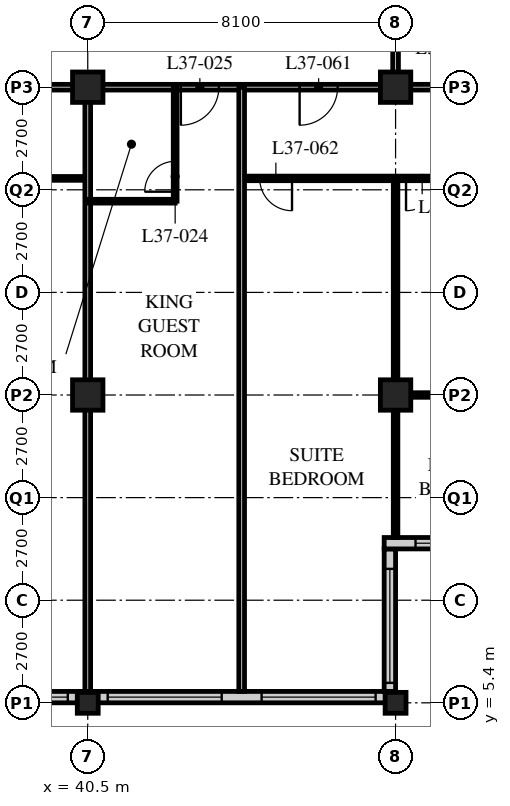
"""IFC4 building model, lengths in metres.
Left out: names, types, materials, properties, quantities, classifications, styles, units other than length and angle.
Written with IfcOpenShell. Run it as: python <this file> out.ifc"""

import sys

from ifc_helpers import new_model, si_unit, direction, frame, frame_2d, origin, origin_2d, place, context, subcontext, project, spatial, rectangle, hollow_rectangle, extrude, element, fill, save


model = new_model("IFC4")
c1 = context("Model", 3, precision=1e-05, world=origin(), true_north=direction((0.0, 1.0)))
c2 = subcontext(c1, "Body", "Model", "MODEL_VIEW")
j1 = project(units=[si_unit("LENGTHUNIT", "METRE"), si_unit("PLANEANGLEUNIT", "RADIAN")], contexts=[c1])
p1 = place(None, origin())
s1 = spatial("IfcSite", under=j1, at=p1, CompositionType="ELEMENT")
p2 = place(p1, origin())
s2 = spatial("IfcBuilding", under=s1, at=p2, CompositionType="ELEMENT")
p3 = place(p2, frame((0.0, 0.0, 144.2)))
s3 = spatial("IfcBuildingStorey", under=s2, at=p3, CompositionType="ELEMENT", Elevation=144.2)
p4 = place(p3, frame((40.5, 5.4, 0.0), z_axis=(0.0, 0.0, 1.0), x_axis=(1.0, 0.0, 0.0)))
e1 = element("IfcColumn", 1, at=p4, inside=s3, PredefinedType="COLUMN", context=c2, shape_type="SweptSolid", body=[
    extrude(hollow_rectangle(XDim=0.55, YDim=0.55, WallThickness=0.04, at=origin_2d()), origin(), (0.0, 0.0, 1.0), 3.4),
])
for number, where, z_axis, x_axis in (
    (2, (40.5, 13.5, 0.0), (0.0, 0.0, 1.0), (1.0, 0.0, 0.0)),
    (3, (40.5, 21.6, 0.0), (0.0, 0.0, 1.0), (1.0, 0.0, 0.0)),
):
    element("IfcColumn", number, at=place(p3, frame(where, z_axis=z_axis, x_axis=x_axis)), inside=s3, PredefinedType="COLUMN", context=c2, shape_type="SweptSolid", body=[
        extrude(hollow_rectangle(XDim=0.8, YDim=0.8, WallThickness=0.08, at=origin_2d()), origin(), (0.0, 0.0, 1.0), 3.4),
    ])
p5 = place(p3, frame((48.6, 5.4, 0.0), z_axis=(0.0, 0.0, 1.0), x_axis=(1.0, 0.0, 0.0)))
e4 = element("IfcColumn", 4, at=p5, inside=s3, PredefinedType="COLUMN", context=c2, shape_type="SweptSolid", body=[
    extrude(hollow_rectangle(XDim=0.55, YDim=0.55, WallThickness=0.04, at=origin_2d()), origin(), (0.0, 0.0, 1.0), 3.4),
])
for number, where, z_axis, x_axis in (
    (5, (48.6, 13.5, 0.0), (0.0, 0.0, 1.0), (1.0, 0.0, 0.0)),
    (6, (48.6, 21.6, 0.0), (0.0, 0.0, 1.0), (1.0, 0.0, 0.0)),
):
    element("IfcColumn", number, at=place(p3, frame(where, z_axis=z_axis, x_axis=x_axis)), inside=s3, PredefinedType="COLUMN", context=c2, shape_type="SweptSolid", body=[
        extrude(hollow_rectangle(XDim=0.8, YDim=0.8, WallThickness=0.08, at=origin_2d()), origin(), (0.0, 0.0, 1.0), 3.4),
    ])
p6 = place(p3, frame((8.4, 5.55, 0.0), z_axis=(0.0, 0.0, 1.0), x_axis=(1.0, 0.0, 0.0)))
e7 = element("IfcWall", 7, at=p6, inside=s3, PredefinedType="SOLIDWALL", context=c2, shape_type="SweptSolid", body=[
    extrude(rectangle(XDim=40.2, YDim=0.3, at=frame_2d((20.1, 0.0))), origin(), (0.0, 0.0, 1.0), 3.19),
])
p7 = place(p6, frame((0.225, 0.0, 0.9)))
e8 = element("IfcOpeningElement", 8, at=p7, cuts=e7, PredefinedType="OPENING", context=c2, shape_type="SweptSolid", body=[
    extrude(rectangle(XDim=3.0, YDim=1.4, at=frame_2d((1.5, 0.7))), frame((0.0, 0.16, 0.0), z_axis=(0.0, -1.0, 0.0), x_axis=(1.0, 0.0, 0.0)), (0.0, 0.0, 1.0), 0.32),
])
p8 = place(p6, frame((4.275, 0.0, 0.9)))
e9 = element("IfcOpeningElement", 9, at=p8, cuts=e7, PredefinedType="OPENING", context=c2, shape_type="SweptSolid", body=[
    extrude(rectangle(XDim=3.0, YDim=1.4, at=frame_2d((1.5, 0.7))), frame((0.0, 0.16, 0.0), z_axis=(0.0, -1.0, 0.0), x_axis=(1.0, 0.0, 0.0)), (0.0, 0.0, 1.0), 0.32),
])
p9 = place(p6, frame((8.325, 0.0, 0.9)))
e10 = element("IfcOpeningElement", 10, at=p9, cuts=e7, PredefinedType="OPENING", context=c2, shape_type="SweptSolid", body=[
    extrude(rectangle(XDim=3.0, YDim=1.4, at=frame_2d((1.5, 0.7))), frame((0.0, 0.16, 0.0), z_axis=(0.0, -1.0, 0.0), x_axis=(1.0, 0.0, 0.0)), (0.0, 0.0, 1.0), 0.32),
])
p10 = place(p6, frame((12.375, 0.0, 0.9)))
e11 = element("IfcOpeningElement", 11, at=p10, cuts=e7, PredefinedType="OPENING", context=c2, shape_type="SweptSolid", body=[
    extrude(rectangle(XDim=3.0, YDim=1.4, at=frame_2d((1.5, 0.7))), frame((0.0, 0.16, 0.0), z_axis=(0.0, -1.0, 0.0), x_axis=(1.0, 0.0, 0.0)), (0.0, 0.0, 1.0), 0.32),
])
p11 = place(p6, frame((16.425, 0.0, 0.9)))
e12 = element("IfcOpeningElement", 12, at=p11, cuts=e7, PredefinedType="OPENING", context=c2, shape_type="SweptSolid", body=[
    extrude(rectangle(XDim=3.0, YDim=1.4, at=frame_2d((1.5, 0.7))), frame((0.0, 0.16, 0.0), z_axis=(0.0, -1.0, 0.0), x_axis=(1.0, 0.0, 0.0)), (0.0, 0.0, 1.0), 0.32),
])
p12 = place(p6, frame((20.475, 0.0, 0.9)))
e13 = element("IfcOpeningElement", 13, at=p12, cuts=e7, PredefinedType="OPENING", context=c2, shape_type="SweptSolid", body=[
    extrude(rectangle(XDim=3.0, YDim=1.4, at=frame_2d((1.5, 0.7))), frame((0.0, 0.16, 0.0), z_axis=(0.0, -1.0, 0.0), x_axis=(1.0, 0.0, 0.0)), (0.0, 0.0, 1.0), 0.32),
])
p13 = place(p6, frame((24.525, 0.0, 0.9)))
e14 = element("IfcOpeningElement", 14, at=p13, cuts=e7, PredefinedType="OPENING", context=c2, shape_type="SweptSolid", body=[
    extrude(rectangle(XDim=3.0, YDim=1.4, at=frame_2d((1.5, 0.7))), frame((0.0, 0.16, 0.0), z_axis=(0.0, -1.0, 0.0), x_axis=(1.0, 0.0, 0.0)), (0.0, 0.0, 1.0), 0.32),
])
p14 = place(p6, frame((28.575, 0.0, 0.9)))
e15 = element("IfcOpeningElement", 15, at=p14, cuts=e7, PredefinedType="OPENING", context=c2, shape_type="SweptSolid", body=[
    extrude(rectangle(XDim=3.0, YDim=1.4, at=frame_2d((1.5, 0.7))), frame((0.0, 0.16, 0.0), z_axis=(0.0, -1.0, 0.0), x_axis=(1.0, 0.0, 0.0)), (0.0, 0.0, 1.0), 0.32),
])
p15 = place(p6, frame((32.625, 0.0, 0.9)))
e16 = element("IfcOpeningElement", 16, at=p15, cuts=e7, PredefinedType="OPENING", context=c2, shape_type="SweptSolid", body=[
    extrude(rectangle(XDim=3.0, YDim=1.4, at=frame_2d((1.5, 0.7))), frame((0.0, 0.16, 0.0), z_axis=(0.0, -1.0, 0.0), x_axis=(1.0, 0.0, 0.0)), (0.0, 0.0, 1.0), 0.32),
])
p16 = place(p6, frame((36.675, 0.0, 0.9)))
e17 = element("IfcOpeningElement", 17, at=p16, cuts=e7, PredefinedType="OPENING", context=c2, shape_type="SweptSolid", body=[
    extrude(rectangle(XDim=3.0, YDim=1.4, at=frame_2d((1.5, 0.7))), frame((0.0, 0.16, 0.0), z_axis=(0.0, -1.0, 0.0), x_axis=(1.0, 0.0, 0.0)), (0.0, 0.0, 1.0), 0.32),
])
p17 = place(p3, frame((48.45, 5.7, 0.0), z_axis=(0.0, 0.0, 1.0), x_axis=(0.0, 1.0, 0.0)))
e18 = element("IfcWall", 18, at=p17, inside=s3, PredefinedType="SOLIDWALL", context=c2, shape_type="SweptSolid", body=[
    extrude(rectangle(XDim=3.75, YDim=0.3, at=frame_2d((1.875, 0.0))), origin(), (0.0, 0.0, 1.0), 3.19),
])
p18 = place(p17, frame((0.225, 0.0, 0.9)))
e19 = element("IfcOpeningElement", 19, at=p18, cuts=e18, PredefinedType="OPENING", context=c2, shape_type="SweptSolid", body=[
    extrude(rectangle(XDim=3.0, YDim=1.4, at=frame_2d((1.5, 0.7))), frame((0.0, 0.16, 0.0), z_axis=(0.0, -1.0, 0.0), x_axis=(1.0, 0.0, 0.0)), (0.0, 0.0, 1.0), 0.32),
])
p19 = place(p3, frame((48.3, 9.6, 0.0), z_axis=(0.0, 0.0, 1.0), x_axis=(1.0, 0.0, 0.0)))
e20 = element("IfcWall", 20, at=p19, inside=s3, PredefinedType="SOLIDWALL", context=c2, shape_type="SweptSolid", body=[
    extrude(rectangle(XDim=4.35, YDim=0.3, at=frame_2d((2.175, 0.0))), origin(), (0.0, 0.0, 1.0), 3.19),
])
p20 = place(p19, frame((0.825, 0.0, 0.9)))
e21 = element("IfcOpeningElement", 21, at=p20, cuts=e20, PredefinedType="OPENING", context=c2, shape_type="SweptSolid", body=[
    extrude(rectangle(XDim=3.0, YDim=1.4, at=frame_2d((1.5, 0.7))), frame((0.0, 0.16, 0.0), z_axis=(0.0, -1.0, 0.0), x_axis=(1.0, 0.0, 0.0)), (0.0, 0.0, 1.0), 0.32),
])
p21 = place(p3, frame((12.15, 21.6, 0.0), z_axis=(0.0, 0.0, 1.0), x_axis=(1.0, 0.0, 0.0)))
e22 = element("IfcWall", 22, at=p21, inside=s3, PredefinedType="PARTITIONING", context=c2, shape_type="SweptSolid", body=[
    extrude(rectangle(XDim=36.45, YDim=0.15, at=frame_2d((18.225, 0.0))), origin(), (0.0, 0.0, 1.0), 2.42),
])
p22 = place(p21, frame((5.95, 0.0, 0.0)))
e23 = element("IfcOpeningElement", 23, at=p22, cuts=e22, PredefinedType="OPENING", context=c2, shape_type="SweptSolid", body=[
    extrude(rectangle(XDim=1.0, YDim=2.1, at=frame_2d((0.5, 1.05))), frame((0.0, 0.085, 0.0), z_axis=(0.0, -1.0, 0.0), x_axis=(1.0, 0.0, 0.0)), (0.0, 0.0, 1.0), 0.17),
])
p23 = place(p21, frame((14.05, 0.0, 0.0)))
e24 = element("IfcOpeningElement", 24, at=p23, cuts=e22, PredefinedType="OPENING", context=c2, shape_type="SweptSolid", body=[
    extrude(rectangle(XDim=1.0, YDim=2.1, at=frame_2d((0.5, 1.05))), frame((0.0, 0.085, 0.0), z_axis=(0.0, -1.0, 0.0), x_axis=(1.0, 0.0, 0.0)), (0.0, 0.0, 1.0), 0.17),
])
p24 = place(p21, frame((22.15, 0.0, 0.0)))
e25 = element("IfcOpeningElement", 25, at=p24, cuts=e22, PredefinedType="OPENING", context=c2, shape_type="SweptSolid", body=[
    extrude(rectangle(XDim=1.0, YDim=2.1, at=frame_2d((0.5, 1.05))), frame((0.0, 0.085, 0.0), z_axis=(0.0, -1.0, 0.0), x_axis=(1.0, 0.0, 0.0)), (0.0, 0.0, 1.0), 0.17),
])
p25 = place(p21, frame((30.8, 0.0, 0.0)))
e26 = element("IfcOpeningElement", 26, at=p25, cuts=e22, PredefinedType="OPENING", context=c2, shape_type="SweptSolid", body=[
    extrude(rectangle(XDim=1.0, YDim=2.1, at=frame_2d((0.5, 1.05))), frame((0.0, 0.085, 0.0), z_axis=(0.0, -1.0, 0.0), x_axis=(1.0, 0.0, 0.0)), (0.0, 0.0, 1.0), 0.17),
])
p26 = place(p21, frame((1.525, 0.0, 0.0)))
e27 = element("IfcOpeningElement", 27, at=p26, cuts=e22, PredefinedType="OPENING", context=c2, shape_type="SweptSolid", body=[
    extrude(rectangle(XDim=1.0, YDim=2.1, at=frame_2d((0.5, 1.05))), frame((0.0, 0.085, 0.0), z_axis=(0.0, -1.0, 0.0), x_axis=(1.0, 0.0, 0.0)), (0.0, 0.0, 1.0), 0.17),
])
p27 = place(p21, frame((33.925, 0.0, 0.0)))
e28 = element("IfcOpeningElement", 28, at=p27, cuts=e22, PredefinedType="OPENING", context=c2, shape_type="SweptSolid", body=[
    extrude(rectangle(XDim=1.0, YDim=2.1, at=frame_2d((0.5, 1.05))), frame((0.0, 0.085, 0.0), z_axis=(0.0, -1.0, 0.0), x_axis=(1.0, 0.0, 0.0)), (0.0, 0.0, 1.0), 0.17),
])
p28 = place(p3, frame((48.6, 21.6, 0.0), z_axis=(0.0, 0.0, 1.0), x_axis=(0.0, 1.0, 0.0)))
e29 = element("IfcWall", 29, at=p28, inside=s3, PredefinedType="PARTITIONING", context=c2, shape_type="SweptSolid", body=[
    extrude(rectangle(XDim=24.3, YDim=0.15, at=frame_2d((12.15, 0.0))), origin(), (0.0, 0.0, 1.0), 2.42),
])
p29 = place(p28, frame((2.75, 0.0, 0.0)))
e30 = element("IfcOpeningElement", 30, at=p29, cuts=e29, PredefinedType="OPENING", context=c2, shape_type="SweptSolid", body=[
    extrude(rectangle(XDim=1.0, YDim=2.1, at=frame_2d((0.5, 1.05))), frame((0.0, 0.085, 0.0), z_axis=(0.0, -1.0, 0.0), x_axis=(1.0, 0.0, 0.0)), (0.0, 0.0, 1.0), 0.17),
])
p30 = place(p28, frame((4.65, 0.0, 0.0)))
e31 = element("IfcOpeningElement", 31, at=p30, cuts=e29, PredefinedType="OPENING", context=c2, shape_type="SweptSolid", body=[
    extrude(rectangle(XDim=1.0, YDim=2.1, at=frame_2d((0.5, 1.05))), frame((0.0, 0.085, 0.0), z_axis=(0.0, -1.0, 0.0), x_axis=(1.0, 0.0, 0.0)), (0.0, 0.0, 1.0), 0.17),
])
p31 = place(p28, frame((13.675, 0.0, 0.0)))
e32 = element("IfcOpeningElement", 32, at=p31, cuts=e29, PredefinedType="OPENING", context=c2, shape_type="SweptSolid", body=[
    extrude(rectangle(XDim=1.0, YDim=2.1, at=frame_2d((0.5, 1.05))), frame((0.0, 0.085, 0.0), z_axis=(0.0, -1.0, 0.0), x_axis=(1.0, 0.0, 0.0)), (0.0, 0.0, 1.0), 0.17),
])
p32 = place(p28, frame((20.85, 0.0, 0.0)))
e33 = element("IfcOpeningElement", 33, at=p32, cuts=e29, PredefinedType="OPENING", context=c2, shape_type="SweptSolid", body=[
    extrude(rectangle(XDim=1.0, YDim=2.1, at=frame_2d((0.5, 1.05))), frame((0.0, 0.085, 0.0), z_axis=(0.0, -1.0, 0.0), x_axis=(1.0, 0.0, 0.0)), (0.0, 0.0, 1.0), 0.17),
])
p33 = place(p3, frame((37.9, 19.2, 0.0), z_axis=(0.0, 0.0, 1.0), x_axis=(1.0, 0.0, 0.0)))
e34 = element("IfcWall", 34, at=p33, inside=s3, PredefinedType="PARTITIONING", context=c2, shape_type="SweptSolid", body=[
    extrude(rectangle(XDim=2.6, YDim=0.1, at=frame_2d((1.3, 0.0))), origin(), (0.0, 0.0, 1.0), 3.19),
])
p34 = place(p3, frame((40.5, 21.6, 0.0), z_axis=(0.0, 0.0, 1.0), x_axis=(0.0, -1.0, 0.0)))
e35 = element("IfcWall", 35, at=p34, inside=s3, PredefinedType="PARTITIONING", context=c2, shape_type="SweptSolid", body=[
    extrude(rectangle(XDim=15.9, YDim=0.15, at=frame_2d((7.95, 0.0))), origin(), (0.0, 0.0, 1.0), 2.42),
])
p35 = place(p3, frame((40.5, 18.6, 0.0), z_axis=(0.0, 0.0, 1.0), x_axis=(1.0, 0.0, 0.0)))
e36 = element("IfcWall", 36, at=p35, inside=s3, PredefinedType="PARTITIONING", context=c2, shape_type="SweptSolid", body=[
    extrude(rectangle(XDim=2.3, YDim=0.1, at=frame_2d((1.15, 0.0))), origin(), (0.0, 0.0, 1.0), 3.19),
])
p36 = place(p3, frame((42.8, 21.6, 0.0), z_axis=(0.0, 0.0, 1.0), x_axis=(0.0, -1.0, 0.0)))
e37 = element("IfcWall", 37, at=p36, inside=s3, PredefinedType="PARTITIONING", context=c2, shape_type="SweptSolid", body=[
    extrude(rectangle(XDim=3.0, YDim=0.1, at=frame_2d((1.5, 0.0))), origin(), (0.0, 0.0, 1.0), 3.19),
])
p37 = place(p36, frame((1.95, 0.0, 0.0)))
e38 = element("IfcOpeningElement", 38, at=p37, cuts=e37, PredefinedType="OPENING", context=c2, shape_type="SweptSolid", body=[
    extrude(rectangle(XDim=0.8, YDim=2.1, at=frame_2d((0.4, 1.05))), frame((0.0, 0.06, 0.0), z_axis=(0.0, -1.0, 0.0), x_axis=(1.0, 0.0, 0.0)), (0.0, 0.0, 1.0), 0.12),
])
p38 = place(p3, frame((44.55, 19.2, 0.0), z_axis=(0.0, 0.0, 1.0), x_axis=(1.0, 0.0, 0.0)))
e39 = element("IfcWall", 39, at=p38, inside=s3, PredefinedType="PARTITIONING", context=c2, shape_type="SweptSolid", body=[
    extrude(rectangle(XDim=8.05, YDim=0.12, at=frame_2d((4.025, 0.0))), origin(), (0.0, 0.0, 1.0), 3.19),
])
p39 = place(p38, frame((0.475, 0.0, 0.0)))
e40 = element("IfcOpeningElement", 40, at=p39, cuts=e39, PredefinedType="OPENING", context=c2, shape_type="SweptSolid", body=[
    extrude(rectangle(XDim=0.85, YDim=2.1, at=frame_2d((0.425, 1.05))), frame((0.0, 0.07, 0.0), z_axis=(0.0, -1.0, 0.0), x_axis=(1.0, 0.0, 0.0)), (0.0, 0.0, 1.0), 0.14),
])
p40 = place(p38, frame((4.325, 0.0, 0.0)))
e41 = element("IfcOpeningElement", 41, at=p40, cuts=e39, PredefinedType="OPENING", context=c2, shape_type="SweptSolid", body=[
    extrude(rectangle(XDim=0.85, YDim=2.1, at=frame_2d((0.425, 1.05))), frame((0.0, 0.07, 0.0), z_axis=(0.0, -1.0, 0.0), x_axis=(1.0, 0.0, 0.0)), (0.0, 0.0, 1.0), 0.14),
])
p41 = place(p3, frame((48.6, 19.2, 0.0), z_axis=(0.0, 0.0, 1.0), x_axis=(0.0, -1.0, 0.0)))
e42 = element("IfcWall", 42, at=p41, inside=s3, PredefinedType="PARTITIONING", context=c2, shape_type="SweptSolid", body=[
    extrude(rectangle(XDim=9.45, YDim=0.12, at=frame_2d((4.725, 0.0))), origin(), (0.0, 0.0, 1.0), 2.42),
])
p42 = place(p3, frame((48.6, 13.5, 0.0), z_axis=(0.0, 0.0, 1.0), x_axis=(1.0, 0.0, 0.0)))
e43 = element("IfcWall", 43, at=p42, inside=s3, PredefinedType="PARTITIONING", context=c2, shape_type="SweptSolid", body=[
    extrude(rectangle(XDim=3.75, YDim=0.12, at=frame_2d((1.875, 0.0))), origin(), (0.0, 0.0, 1.0), 2.42),
])
p43 = place(p42, frame((1.875, 0.0, 0.0)))
e44 = element("IfcOpeningElement", 44, at=p43, cuts=e43, PredefinedType="OPENING", context=c2, shape_type="SweptSolid", body=[
    extrude(rectangle(XDim=0.85, YDim=2.1, at=frame_2d((0.425, 1.05))), frame((0.0, 0.07, 0.0), z_axis=(0.0, -1.0, 0.0), x_axis=(1.0, 0.0, 0.0)), (0.0, 0.0, 1.0), 0.14),
])
p44 = place(p3, frame((48.6, 21.6, 0.0), z_axis=(0.0, 0.0, 1.0), x_axis=(1.0, 0.0, 0.0)))
e45 = element("IfcWall", 45, at=p44, inside=s3, PredefinedType="PARTITIONING", context=c2, shape_type="SweptSolid", body=[
    extrude(rectangle(XDim=7.8, YDim=0.15, at=frame_2d((3.9, 0.0))), origin(), (0.0, 0.0, 1.0), 2.42),
])
p45 = place(p3, frame((44.55, 21.6, 0.0), z_axis=(0.0, 0.0, 1.0), x_axis=(0.0, -1.0, 0.0)))
e46 = element("IfcWall", 46, at=p45, inside=s3, PredefinedType="PARTITIONING", context=c2, shape_type="SweptSolid", body=[
    extrude(rectangle(XDim=15.9, YDim=0.15, at=frame_2d((7.95, 0.0))), origin(), (0.0, 0.0, 1.0), 3.19),
])
p46 = place(p14, origin())
e47 = element("IfcWindow", 47, at=p46, inside=s3, PartitioningType="SINGLE_PANEL", PredefinedType="WINDOW", context=c2, shape_type="SweptSolid", body=[
    extrude(rectangle(XDim=3.0, YDim=1.4, at=frame_2d((1.5, 0.7))), frame((0.0, 0.03, 0.0), z_axis=(0.0, -1.0, 0.0), x_axis=(1.0, 0.0, 0.0)), (0.0, 0.0, 1.0), 0.06),
])
fill(e15, e47)
p47 = place(p15, origin())
e48 = element("IfcWindow", 48, at=p47, inside=s3, PartitioningType="SINGLE_PANEL", PredefinedType="WINDOW", context=c2, shape_type="SweptSolid", body=[
    extrude(rectangle(XDim=3.0, YDim=1.4, at=frame_2d((1.5, 0.7))), frame((0.0, 0.03, 0.0), z_axis=(0.0, -1.0, 0.0), x_axis=(1.0, 0.0, 0.0)), (0.0, 0.0, 1.0), 0.06),
])
fill(e16, e48)
p48 = place(p16, origin())
e49 = element("IfcWindow", 49, at=p48, inside=s3, PartitioningType="SINGLE_PANEL", PredefinedType="WINDOW", context=c2, shape_type="SweptSolid", body=[
    extrude(rectangle(XDim=3.0, YDim=1.4, at=frame_2d((1.5, 0.7))), frame((0.0, 0.03, 0.0), z_axis=(0.0, -1.0, 0.0), x_axis=(1.0, 0.0, 0.0)), (0.0, 0.0, 1.0), 0.06),
])
fill(e17, e49)
p49 = place(p18, origin())
e50 = element("IfcWindow", 50, at=p49, inside=s3, PartitioningType="SINGLE_PANEL", PredefinedType="WINDOW", context=c2, shape_type="SweptSolid", body=[
    extrude(rectangle(XDim=3.0, YDim=1.4, at=frame_2d((1.5, 0.7))), frame((0.0, 0.03, 0.0), z_axis=(0.0, -1.0, 0.0), x_axis=(1.0, 0.0, 0.0)), (0.0, 0.0, 1.0), 0.06),
])
fill(e19, e50)
p50 = place(p20, origin())
e51 = element("IfcWindow", 51, at=p50, inside=s3, PartitioningType="SINGLE_PANEL", PredefinedType="WINDOW", context=c2, shape_type="SweptSolid", body=[
    extrude(rectangle(XDim=3.0, YDim=1.4, at=frame_2d((1.5, 0.7))), frame((0.0, 0.03, 0.0), z_axis=(0.0, -1.0, 0.0), x_axis=(1.0, 0.0, 0.0)), (0.0, 0.0, 1.0), 0.06),
])
fill(e21, e51)
p51 = place(p37, origin())
e52 = element("IfcDoor", 52, at=p51, inside=s3, OperationType="SINGLE_SWING_LEFT", PredefinedType="DOOR", context=c2, shape_type="SweptSolid", body=[
    extrude(rectangle(XDim=0.8, YDim=2.1, at=frame_2d((0.4, 1.05))), frame((0.0, 0.025, 0.0), z_axis=(0.0, -1.0, 0.0), x_axis=(1.0, 0.0, 0.0)), (0.0, 0.0, 1.0), 0.05),
])
fill(e38, e52)
p52 = place(p25, origin())
e53 = element("IfcDoor", 53, at=p52, inside=s3, OperationType="SINGLE_SWING_RIGHT", PredefinedType="DOOR", context=c2, shape_type="SweptSolid", body=[
    extrude(rectangle(XDim=1.0, YDim=2.1, at=frame_2d((0.5, 1.05))), frame((0.0, 0.025, 0.0), z_axis=(0.0, -1.0, 0.0), x_axis=(1.0, 0.0, 0.0)), (0.0, 0.0, 1.0), 0.05),
])
fill(e26, e53)
p53 = place(p27, origin())
e54 = element("IfcDoor", 54, at=p53, inside=s3, OperationType="SINGLE_SWING_RIGHT", PredefinedType="DOOR", context=c2, shape_type="SweptSolid", body=[
    extrude(rectangle(XDim=1.0, YDim=2.1, at=frame_2d((0.5, 1.05))), frame((0.0, 0.025, 0.0), z_axis=(0.0, -1.0, 0.0), x_axis=(1.0, 0.0, 0.0)), (0.0, 0.0, 1.0), 0.05),
])
fill(e28, e54)
p54 = place(p39, origin())
e55 = element("IfcDoor", 55, at=p54, inside=s3, OperationType="SINGLE_SWING_LEFT", PredefinedType="DOOR", context=c2, shape_type="SweptSolid", body=[
    extrude(rectangle(XDim=0.85, YDim=2.1, at=frame_2d((0.425, 1.05))), frame((0.0, 0.025, 0.0), z_axis=(0.0, -1.0, 0.0), x_axis=(1.0, 0.0, 0.0)), (0.0, 0.0, 1.0), 0.05),
])
fill(e40, e55)
p55 = place(p40, origin())
e56 = element("IfcDoor", 56, at=p55, inside=s3, OperationType="SINGLE_SWING_RIGHT", PredefinedType="DOOR", context=c2, shape_type="SweptSolid", body=[
    extrude(rectangle(XDim=0.85, YDim=2.1, at=frame_2d((0.425, 1.05))), frame((0.0, 0.025, 0.0), z_axis=(0.0, -1.0, 0.0), x_axis=(1.0, 0.0, 0.0)), (0.0, 0.0, 1.0), 0.05),
])
fill(e41, e56)
save(model, sys.argv[1])
